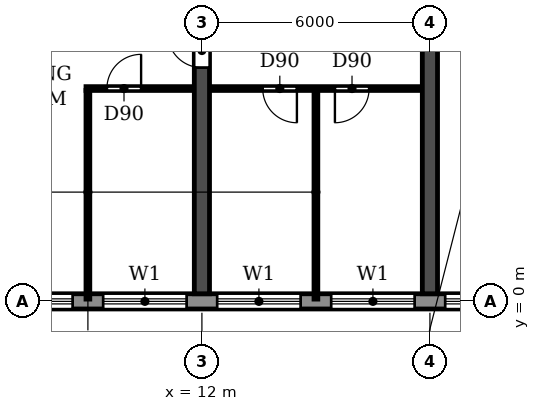
"""IFC4 building model, lengths in metres.
Left out: names, types, materials, properties, quantities, classifications, styles, units other than length and angle.
Written with IfcOpenShell. Run it as: python <this file> out.ifc"""

import sys

from ifc_helpers import new_model, si_unit, direction, frame, frame_2d, origin, place, context, subcontext, project, spatial, rectangle, extrude, element, fill, save


model = new_model("IFC4")
c1 = context("Model", 3, precision=1e-05, world=origin(), true_north=direction((0.0, 1.0)))
c2 = subcontext(c1, "Body", "Model", "MODEL_VIEW")
j1 = project(units=[si_unit("LENGTHUNIT", "METRE"), si_unit("PLANEANGLEUNIT", "RADIAN")], contexts=[c1])
p1 = place(None, origin())
s1 = spatial("IfcSite", under=j1, at=p1, CompositionType="ELEMENT")
p2 = place(p1, origin())
s2 = spatial("IfcBuilding", under=s1, at=p2, CompositionType="ELEMENT")
p3 = place(p2, frame((0.0, 0.0, 26.7)))
s3 = spatial("IfcBuildingStorey", under=s2, at=p3, CompositionType="ELEMENT", Elevation=26.7)
p4 = place(p3, frame((12.0, 0.2, 0.0), z_axis=(0.0, 0.0, 1.0), x_axis=(0.0, 1.0, 0.0)))
e1 = element("IfcWall", 1, at=p4, inside=s3, PredefinedType="SHEAR", context=c2, shape_type="SweptSolid", body=[
    extrude(rectangle(XDim=11.65, YDim=0.4, at=frame_2d((5.825, 0.0))), origin(), (0.0, 0.0, 1.0), 3.05),
])
p5 = place(p4, frame((5.95, 0.0, 0.0)))
e2 = element("IfcOpeningElement", 2, at=p5, cuts=e1, PredefinedType="OPENING", context=c2, shape_type="SweptSolid", body=[
    extrude(rectangle(XDim=0.9, YDim=2.1, at=frame_2d((0.45, 1.05))), frame((0.0, 0.21, 0.0), z_axis=(0.0, -1.0, 0.0), x_axis=(1.0, 0.0, 0.0)), (0.0, 0.0, 1.0), 0.42),
])
p6 = place(p3, frame((18.0, 0.2, 0.0), z_axis=(0.0, 0.0, 1.0), x_axis=(0.0, 1.0, 0.0)))
e3 = element("IfcWall", 3, at=p6, inside=s3, PredefinedType="SHEAR", context=c2, shape_type="SweptSolid", body=[
    extrude(rectangle(XDim=11.65, YDim=0.4, at=frame_2d((5.825, 0.0))), origin(), (0.0, 0.0, 1.0), 3.05),
])
p7 = place(p3, frame((4.683, 0.0, 0.0), z_axis=(0.0, 0.0, 1.0), x_axis=(1.0, 0.0, 0.0)))
e4 = element("IfcWall", 4, at=p7, inside=s3, PredefinedType="STANDARD", context=c2, shape_type="SweptSolid", body=[
    extrude(rectangle(XDim=92.634, YDim=0.4, at=frame_2d((46.317, 0.0))), origin(), (0.0, 0.0, 1.0), 3.05),
])
p8 = place(p7, frame((1.717, 0.0, 0.9)))
e5 = element("IfcOpeningElement", 5, at=p8, cuts=e4, PredefinedType="OPENING", context=c2, shape_type="SweptSolid", body=[
    extrude(rectangle(XDim=2.2, YDim=1.5, at=frame_2d((1.1, 0.75))), frame((0.0, 0.21, 0.0), z_axis=(0.0, -1.0, 0.0), x_axis=(1.0, 0.0, 0.0)), (0.0, 0.0, 1.0), 0.42),
])
p9 = place(p7, frame((4.717, 0.0, 0.9)))
e6 = element("IfcOpeningElement", 6, at=p9, cuts=e4, PredefinedType="OPENING", context=c2, shape_type="SweptSolid", body=[
    extrude(rectangle(XDim=2.2, YDim=1.5, at=frame_2d((1.1, 0.75))), frame((0.0, 0.21, 0.0), z_axis=(0.0, -1.0, 0.0), x_axis=(1.0, 0.0, 0.0)), (0.0, 0.0, 1.0), 0.42),
])
p10 = place(p7, frame((7.717, 0.0, 0.9)))
e7 = element("IfcOpeningElement", 7, at=p10, cuts=e4, PredefinedType="OPENING", context=c2, shape_type="SweptSolid", body=[
    extrude(rectangle(XDim=2.2, YDim=1.5, at=frame_2d((1.1, 0.75))), frame((0.0, 0.21, 0.0), z_axis=(0.0, -1.0, 0.0), x_axis=(1.0, 0.0, 0.0)), (0.0, 0.0, 1.0), 0.42),
])
p11 = place(p7, frame((10.717, 0.0, 0.9)))
e8 = element("IfcOpeningElement", 8, at=p11, cuts=e4, PredefinedType="OPENING", context=c2, shape_type="SweptSolid", body=[
    extrude(rectangle(XDim=2.2, YDim=1.5, at=frame_2d((1.1, 0.75))), frame((0.0, 0.21, 0.0), z_axis=(0.0, -1.0, 0.0), x_axis=(1.0, 0.0, 0.0)), (0.0, 0.0, 1.0), 0.42),
])
p12 = place(p7, frame((13.717, 0.0, 0.9)))
e9 = element("IfcOpeningElement", 9, at=p12, cuts=e4, PredefinedType="OPENING", context=c2, shape_type="SweptSolid", body=[
    extrude(rectangle(XDim=2.2, YDim=1.5, at=frame_2d((1.1, 0.75))), frame((0.0, 0.21, 0.0), z_axis=(0.0, -1.0, 0.0), x_axis=(1.0, 0.0, 0.0)), (0.0, 0.0, 1.0), 0.42),
])
p13 = place(p7, frame((16.717, 0.0, 0.9)))
e10 = element("IfcOpeningElement", 10, at=p13, cuts=e4, PredefinedType="OPENING", context=c2, shape_type="SweptSolid", body=[
    extrude(rectangle(XDim=2.2, YDim=1.5, at=frame_2d((1.1, 0.75))), frame((0.0, 0.21, 0.0), z_axis=(0.0, -1.0, 0.0), x_axis=(1.0, 0.0, 0.0)), (0.0, 0.0, 1.0), 0.42),
])
p14 = place(p7, frame((19.917, 0.0, 0.0)))
e11 = element("IfcOpeningElement", 11, at=p14, cuts=e4, PredefinedType="OPENING", context=c2, shape_type="SweptSolid", body=[
    extrude(rectangle(XDim=1.8, YDim=2.4, at=frame_2d((0.9, 1.2))), frame((0.0, 0.21, 0.0), z_axis=(0.0, -1.0, 0.0), x_axis=(1.0, 0.0, 0.0)), (0.0, 0.0, 1.0), 0.42),
])
p15 = place(p7, frame((22.717, 0.0, 0.9)))
e12 = element("IfcOpeningElement", 12, at=p15, cuts=e4, PredefinedType="OPENING", context=c2, shape_type="SweptSolid", body=[
    extrude(rectangle(XDim=2.2, YDim=1.5, at=frame_2d((1.1, 0.75))), frame((0.0, 0.21, 0.0), z_axis=(0.0, -1.0, 0.0), x_axis=(1.0, 0.0, 0.0)), (0.0, 0.0, 1.0), 0.42),
])
p16 = place(p7, frame((25.717, 0.0, 0.9)))
e13 = element("IfcOpeningElement", 13, at=p16, cuts=e4, PredefinedType="OPENING", context=c2, shape_type="SweptSolid", body=[
    extrude(rectangle(XDim=2.2, YDim=1.5, at=frame_2d((1.1, 0.75))), frame((0.0, 0.21, 0.0), z_axis=(0.0, -1.0, 0.0), x_axis=(1.0, 0.0, 0.0)), (0.0, 0.0, 1.0), 0.42),
])
p17 = place(p7, frame((28.717, 0.0, 0.9)))
e14 = element("IfcOpeningElement", 14, at=p17, cuts=e4, PredefinedType="OPENING", context=c2, shape_type="SweptSolid", body=[
    extrude(rectangle(XDim=2.2, YDim=1.5, at=frame_2d((1.1, 0.75))), frame((0.0, 0.21, 0.0), z_axis=(0.0, -1.0, 0.0), x_axis=(1.0, 0.0, 0.0)), (0.0, 0.0, 1.0), 0.42),
])
p18 = place(p7, frame((31.917, 0.0, 0.0)))
e15 = element("IfcOpeningElement", 15, at=p18, cuts=e4, PredefinedType="OPENING", context=c2, shape_type="SweptSolid", body=[
    extrude(rectangle(XDim=1.8, YDim=2.4, at=frame_2d((0.9, 1.2))), frame((0.0, 0.21, 0.0), z_axis=(0.0, -1.0, 0.0), x_axis=(1.0, 0.0, 0.0)), (0.0, 0.0, 1.0), 0.42),
])
p19 = place(p7, frame((34.717, 0.0, 0.9)))
e16 = element("IfcOpeningElement", 16, at=p19, cuts=e4, PredefinedType="OPENING", context=c2, shape_type="SweptSolid", body=[
    extrude(rectangle(XDim=2.2, YDim=1.5, at=frame_2d((1.1, 0.75))), frame((0.0, 0.21, 0.0), z_axis=(0.0, -1.0, 0.0), x_axis=(1.0, 0.0, 0.0)), (0.0, 0.0, 1.0), 0.42),
])
p20 = place(p7, frame((37.717, 0.0, 0.9)))
e17 = element("IfcOpeningElement", 17, at=p20, cuts=e4, PredefinedType="OPENING", context=c2, shape_type="SweptSolid", body=[
    extrude(rectangle(XDim=2.2, YDim=1.5, at=frame_2d((1.1, 0.75))), frame((0.0, 0.21, 0.0), z_axis=(0.0, -1.0, 0.0), x_axis=(1.0, 0.0, 0.0)), (0.0, 0.0, 1.0), 0.42),
])
p21 = place(p7, frame((40.717, 0.0, 0.9)))
e18 = element("IfcOpeningElement", 18, at=p21, cuts=e4, PredefinedType="OPENING", context=c2, shape_type="SweptSolid", body=[
    extrude(rectangle(XDim=2.2, YDim=1.5, at=frame_2d((1.1, 0.75))), frame((0.0, 0.21, 0.0), z_axis=(0.0, -1.0, 0.0), x_axis=(1.0, 0.0, 0.0)), (0.0, 0.0, 1.0), 0.42),
])
p22 = place(p7, frame((43.917, 0.0, 0.0)))
e19 = element("IfcOpeningElement", 19, at=p22, cuts=e4, PredefinedType="OPENING", context=c2, shape_type="SweptSolid", body=[
    extrude(rectangle(XDim=1.8, YDim=2.4, at=frame_2d((0.9, 1.2))), frame((0.0, 0.21, 0.0), z_axis=(0.0, -1.0, 0.0), x_axis=(1.0, 0.0, 0.0)), (0.0, 0.0, 1.0), 0.42),
])
p23 = place(p7, frame((46.717, 0.0, 0.9)))
e20 = element("IfcOpeningElement", 20, at=p23, cuts=e4, PredefinedType="OPENING", context=c2, shape_type="SweptSolid", body=[
    extrude(rectangle(XDim=2.2, YDim=1.5, at=frame_2d((1.1, 0.75))), frame((0.0, 0.21, 0.0), z_axis=(0.0, -1.0, 0.0), x_axis=(1.0, 0.0, 0.0)), (0.0, 0.0, 1.0), 0.42),
])
p24 = place(p7, frame((49.717, 0.0, 0.9)))
e21 = element("IfcOpeningElement", 21, at=p24, cuts=e4, PredefinedType="OPENING", context=c2, shape_type="SweptSolid", body=[
    extrude(rectangle(XDim=2.2, YDim=1.5, at=frame_2d((1.1, 0.75))), frame((0.0, 0.21, 0.0), z_axis=(0.0, -1.0, 0.0), x_axis=(1.0, 0.0, 0.0)), (0.0, 0.0, 1.0), 0.42),
])
p25 = place(p7, frame((52.717, 0.0, 0.9)))
e22 = element("IfcOpeningElement", 22, at=p25, cuts=e4, PredefinedType="OPENING", context=c2, shape_type="SweptSolid", body=[
    extrude(rectangle(XDim=2.2, YDim=1.5, at=frame_2d((1.1, 0.75))), frame((0.0, 0.21, 0.0), z_axis=(0.0, -1.0, 0.0), x_axis=(1.0, 0.0, 0.0)), (0.0, 0.0, 1.0), 0.42),
])
p26 = place(p7, frame((55.717, 0.0, 0.9)))
e23 = element("IfcOpeningElement", 23, at=p26, cuts=e4, PredefinedType="OPENING", context=c2, shape_type="SweptSolid", body=[
    extrude(rectangle(XDim=2.2, YDim=1.5, at=frame_2d((1.1, 0.75))), frame((0.0, 0.21, 0.0), z_axis=(0.0, -1.0, 0.0), x_axis=(1.0, 0.0, 0.0)), (0.0, 0.0, 1.0), 0.42),
])
p27 = place(p7, frame((58.917, 0.0, 0.0)))
e24 = element("IfcOpeningElement", 24, at=p27, cuts=e4, PredefinedType="OPENING", context=c2, shape_type="SweptSolid", body=[
    extrude(rectangle(XDim=1.8, YDim=2.4, at=frame_2d((0.9, 1.2))), frame((0.0, 0.21, 0.0), z_axis=(0.0, -1.0, 0.0), x_axis=(1.0, 0.0, 0.0)), (0.0, 0.0, 1.0), 0.42),
])
p28 = place(p7, frame((61.717, 0.0, 0.9)))
e25 = element("IfcOpeningElement", 25, at=p28, cuts=e4, PredefinedType="OPENING", context=c2, shape_type="SweptSolid", body=[
    extrude(rectangle(XDim=2.2, YDim=1.5, at=frame_2d((1.1, 0.75))), frame((0.0, 0.21, 0.0), z_axis=(0.0, -1.0, 0.0), x_axis=(1.0, 0.0, 0.0)), (0.0, 0.0, 1.0), 0.42),
])
p29 = place(p7, frame((64.717, 0.0, 0.9)))
e26 = element("IfcOpeningElement", 26, at=p29, cuts=e4, PredefinedType="OPENING", context=c2, shape_type="SweptSolid", body=[
    extrude(rectangle(XDim=2.2, YDim=1.5, at=frame_2d((1.1, 0.75))), frame((0.0, 0.21, 0.0), z_axis=(0.0, -1.0, 0.0), x_axis=(1.0, 0.0, 0.0)), (0.0, 0.0, 1.0), 0.42),
])
p30 = place(p7, frame((67.717, 0.0, 0.9)))
e27 = element("IfcOpeningElement", 27, at=p30, cuts=e4, PredefinedType="OPENING", context=c2, shape_type="SweptSolid", body=[
    extrude(rectangle(XDim=2.2, YDim=1.5, at=frame_2d((1.1, 0.75))), frame((0.0, 0.21, 0.0), z_axis=(0.0, -1.0, 0.0), x_axis=(1.0, 0.0, 0.0)), (0.0, 0.0, 1.0), 0.42),
])
p31 = place(p7, frame((70.917, 0.0, 0.0)))
e28 = element("IfcOpeningElement", 28, at=p31, cuts=e4, PredefinedType="OPENING", context=c2, shape_type="SweptSolid", body=[
    extrude(rectangle(XDim=1.8, YDim=2.4, at=frame_2d((0.9, 1.2))), frame((0.0, 0.21, 0.0), z_axis=(0.0, -1.0, 0.0), x_axis=(1.0, 0.0, 0.0)), (0.0, 0.0, 1.0), 0.42),
])
p32 = place(p7, frame((73.717, 0.0, 0.9)))
e29 = element("IfcOpeningElement", 29, at=p32, cuts=e4, PredefinedType="OPENING", context=c2, shape_type="SweptSolid", body=[
    extrude(rectangle(XDim=2.2, YDim=1.5, at=frame_2d((1.1, 0.75))), frame((0.0, 0.21, 0.0), z_axis=(0.0, -1.0, 0.0), x_axis=(1.0, 0.0, 0.0)), (0.0, 0.0, 1.0), 0.42),
])
p33 = place(p7, frame((76.717, 0.0, 0.9)))
e30 = element("IfcOpeningElement", 30, at=p33, cuts=e4, PredefinedType="OPENING", context=c2, shape_type="SweptSolid", body=[
    extrude(rectangle(XDim=2.2, YDim=1.5, at=frame_2d((1.1, 0.75))), frame((0.0, 0.21, 0.0), z_axis=(0.0, -1.0, 0.0), x_axis=(1.0, 0.0, 0.0)), (0.0, 0.0, 1.0), 0.42),
])
p34 = place(p7, frame((79.717, 0.0, 0.9)))
e31 = element("IfcOpeningElement", 31, at=p34, cuts=e4, PredefinedType="OPENING", context=c2, shape_type="SweptSolid", body=[
    extrude(rectangle(XDim=2.2, YDim=1.5, at=frame_2d((1.1, 0.75))), frame((0.0, 0.21, 0.0), z_axis=(0.0, -1.0, 0.0), x_axis=(1.0, 0.0, 0.0)), (0.0, 0.0, 1.0), 0.42),
])
p35 = place(p7, frame((82.717, 0.0, 0.9)))
e32 = element("IfcOpeningElement", 32, at=p35, cuts=e4, PredefinedType="OPENING", context=c2, shape_type="SweptSolid", body=[
    extrude(rectangle(XDim=2.2, YDim=1.5, at=frame_2d((1.1, 0.75))), frame((0.0, 0.21, 0.0), z_axis=(0.0, -1.0, 0.0), x_axis=(1.0, 0.0, 0.0)), (0.0, 0.0, 1.0), 0.42),
])
p36 = place(p7, frame((85.717, 0.0, 0.9)))
e33 = element("IfcOpeningElement", 33, at=p36, cuts=e4, PredefinedType="OPENING", context=c2, shape_type="SweptSolid", body=[
    extrude(rectangle(XDim=2.2, YDim=1.5, at=frame_2d((1.1, 0.75))), frame((0.0, 0.21, 0.0), z_axis=(0.0, -1.0, 0.0), x_axis=(1.0, 0.0, 0.0)), (0.0, 0.0, 1.0), 0.42),
])
p37 = place(p7, frame((88.717, 0.0, 0.9)))
e34 = element("IfcOpeningElement", 34, at=p37, cuts=e4, PredefinedType="OPENING", context=c2, shape_type="SweptSolid", body=[
    extrude(rectangle(XDim=2.2, YDim=1.5, at=frame_2d((1.1, 0.75))), frame((0.0, 0.21, 0.0), z_axis=(0.0, -1.0, 0.0), x_axis=(1.0, 0.0, 0.0)), (0.0, 0.0, 1.0), 0.42),
])
p38 = place(p3, frame((8.95, 5.6, 0.0), z_axis=(0.0, 0.0, 1.0), x_axis=(1.0, 0.0, 0.0)))
e35 = element("IfcWall", 35, at=p38, inside=s3, PredefinedType="PARTITIONING", context=c2, shape_type="SweptSolid", body=[
    extrude(rectangle(XDim=2.84, YDim=0.1, at=frame_2d((1.42, 0.0))), origin(), (0.0, 0.0, 1.0), 3.05),
])
p39 = place(p38, frame((0.55, 0.0, 0.0)))
e36 = element("IfcOpeningElement", 36, at=p39, cuts=e35, PredefinedType="OPENING", context=c2, shape_type="SweptSolid", body=[
    extrude(rectangle(XDim=0.9, YDim=2.1, at=frame_2d((0.45, 1.05))), frame((0.0, 0.06, 0.0), z_axis=(0.0, -1.0, 0.0), x_axis=(1.0, 0.0, 0.0)), (0.0, 0.0, 1.0), 0.12),
])
p40 = place(p3, frame((12.21, 5.6, 0.0), z_axis=(0.0, 0.0, 1.0), x_axis=(1.0, 0.0, 0.0)))
e37 = element("IfcWall", 37, at=p40, inside=s3, PredefinedType="PARTITIONING", context=c2, shape_type="SweptSolid", body=[
    extrude(rectangle(XDim=5.58, YDim=0.1, at=frame_2d((2.79, 0.0))), origin(), (0.0, 0.0, 1.0), 3.05),
])
p41 = place(p40, frame((1.39, 0.0, 0.0)))
e38 = element("IfcOpeningElement", 38, at=p41, cuts=e37, PredefinedType="OPENING", context=c2, shape_type="SweptSolid", body=[
    extrude(rectangle(XDim=0.9, YDim=2.1, at=frame_2d((0.45, 1.05))), frame((0.0, 0.06, 0.0), z_axis=(0.0, -1.0, 0.0), x_axis=(1.0, 0.0, 0.0)), (0.0, 0.0, 1.0), 0.12),
])
p42 = place(p40, frame((3.29, 0.0, 0.0)))
e39 = element("IfcOpeningElement", 39, at=p42, cuts=e37, PredefinedType="OPENING", context=c2, shape_type="SweptSolid", body=[
    extrude(rectangle(XDim=0.9, YDim=2.1, at=frame_2d((0.45, 1.05))), frame((0.0, 0.06, 0.0), z_axis=(0.0, -1.0, 0.0), x_axis=(1.0, 0.0, 0.0)), (0.0, 0.0, 1.0), 0.12),
])
for number, where, z_axis, x_axis in (
    (40, (9.0, 0.06, 0.0), (0.0, 0.0, 1.0), (0.0, 1.0, 0.0)),
    (41, (15.0, 0.06, 0.0), (0.0, 0.0, 1.0), (0.0, 1.0, 0.0)),
):
    element("IfcWall", number, at=place(p3, frame(where, z_axis=z_axis, x_axis=x_axis)), inside=s3, PredefinedType="PARTITIONING", context=c2, shape_type="SweptSolid", body=[
        extrude(rectangle(XDim=5.49, YDim=0.1, at=frame_2d((2.745, 0.0))), origin(), (0.0, 0.0, 1.0), 3.05),
    ])
p43 = place(p8, origin())
e42 = element("IfcWindow", 42, at=p43, inside=s3, PartitioningType="DOUBLE_PANEL_HORIZONTAL", PredefinedType="WINDOW", context=c2, shape_type="SweptSolid", body=[
    extrude(rectangle(XDim=2.2, YDim=1.5, at=frame_2d((1.1, 0.75))), frame((0.0, 0.03, 0.0), z_axis=(0.0, -1.0, 0.0), x_axis=(1.0, 0.0, 0.0)), (0.0, 0.0, 1.0), 0.06),
])
fill(e5, e42)
p44 = place(p9, origin())
e43 = element("IfcWindow", 43, at=p44, inside=s3, PartitioningType="DOUBLE_PANEL_HORIZONTAL", PredefinedType="WINDOW", context=c2, shape_type="SweptSolid", body=[
    extrude(rectangle(XDim=2.2, YDim=1.5, at=frame_2d((1.1, 0.75))), frame((0.0, 0.03, 0.0), z_axis=(0.0, -1.0, 0.0), x_axis=(1.0, 0.0, 0.0)), (0.0, 0.0, 1.0), 0.06),
])
fill(e6, e43)
p45 = place(p10, origin())
e44 = element("IfcWindow", 44, at=p45, inside=s3, PartitioningType="DOUBLE_PANEL_HORIZONTAL", PredefinedType="WINDOW", context=c2, shape_type="SweptSolid", body=[
    extrude(rectangle(XDim=2.2, YDim=1.5, at=frame_2d((1.1, 0.75))), frame((0.0, 0.03, 0.0), z_axis=(0.0, -1.0, 0.0), x_axis=(1.0, 0.0, 0.0)), (0.0, 0.0, 1.0), 0.06),
])
fill(e7, e44)
p46 = place(p11, origin())
e45 = element("IfcWindow", 45, at=p46, inside=s3, PartitioningType="DOUBLE_PANEL_HORIZONTAL", PredefinedType="WINDOW", context=c2, shape_type="SweptSolid", body=[
    extrude(rectangle(XDim=2.2, YDim=1.5, at=frame_2d((1.1, 0.75))), frame((0.0, 0.03, 0.0), z_axis=(0.0, -1.0, 0.0), x_axis=(1.0, 0.0, 0.0)), (0.0, 0.0, 1.0), 0.06),
])
fill(e8, e45)
p47 = place(p12, origin())
e46 = element("IfcWindow", 46, at=p47, inside=s3, PartitioningType="DOUBLE_PANEL_HORIZONTAL", PredefinedType="WINDOW", context=c2, shape_type="SweptSolid", body=[
    extrude(rectangle(XDim=2.2, YDim=1.5, at=frame_2d((1.1, 0.75))), frame((0.0, 0.03, 0.0), z_axis=(0.0, -1.0, 0.0), x_axis=(1.0, 0.0, 0.0)), (0.0, 0.0, 1.0), 0.06),
])
fill(e9, e46)
p48 = place(p41, frame((0.9, 0.0, 0.0), z_axis=(0.0, 0.0, 1.0), x_axis=(-1.0, 0.0, 0.0)))
e47 = element("IfcDoor", 47, at=p48, inside=s3, OperationType="SINGLE_SWING_LEFT", PredefinedType="DOOR", context=c2, shape_type="SweptSolid", body=[
    extrude(rectangle(XDim=0.9, YDim=2.1, at=frame_2d((0.45, 1.05))), frame((0.0, 0.025, 0.0), z_axis=(0.0, -1.0, 0.0), x_axis=(1.0, 0.0, 0.0)), (0.0, 0.0, 1.0), 0.05),
])
fill(e38, e47)
p49 = place(p42, frame((0.9, 0.0, 0.0), z_axis=(0.0, 0.0, 1.0), x_axis=(-1.0, 0.0, 0.0)))
e48 = element("IfcDoor", 48, at=p49, inside=s3, OperationType="SINGLE_SWING_RIGHT", PredefinedType="DOOR", context=c2, shape_type="SweptSolid", body=[
    extrude(rectangle(XDim=0.9, YDim=2.1, at=frame_2d((0.45, 1.05))), frame((0.0, 0.025, 0.0), z_axis=(0.0, -1.0, 0.0), x_axis=(1.0, 0.0, 0.0)), (0.0, 0.0, 1.0), 0.05),
])
fill(e39, e48)
p50 = place(p39, origin())
e49 = element("IfcDoor", 49, at=p50, inside=s3, OperationType="SINGLE_SWING_RIGHT", PredefinedType="DOOR", context=c2, shape_type="SweptSolid", body=[
    extrude(rectangle(XDim=0.9, YDim=2.1, at=frame_2d((0.45, 1.05))), frame((0.0, 0.025, 0.0), z_axis=(0.0, -1.0, 0.0), x_axis=(1.0, 0.0, 0.0)), (0.0, 0.0, 1.0), 0.05),
])
fill(e36, e49)
p51 = place(p5, origin())
e50 = element("IfcDoor", 50, at=p51, inside=s3, OperationType="SINGLE_SWING_RIGHT", PredefinedType="DOOR", context=c2, shape_type="SweptSolid", body=[
    extrude(rectangle(XDim=0.9, YDim=2.1, at=frame_2d((0.45, 1.05))), frame((0.0, 0.025, 0.0), z_axis=(0.0, -1.0, 0.0), x_axis=(1.0, 0.0, 0.0)), (0.0, 0.0, 1.0), 0.05),
])
fill(e2, e50)
save(model, sys.argv[1])
